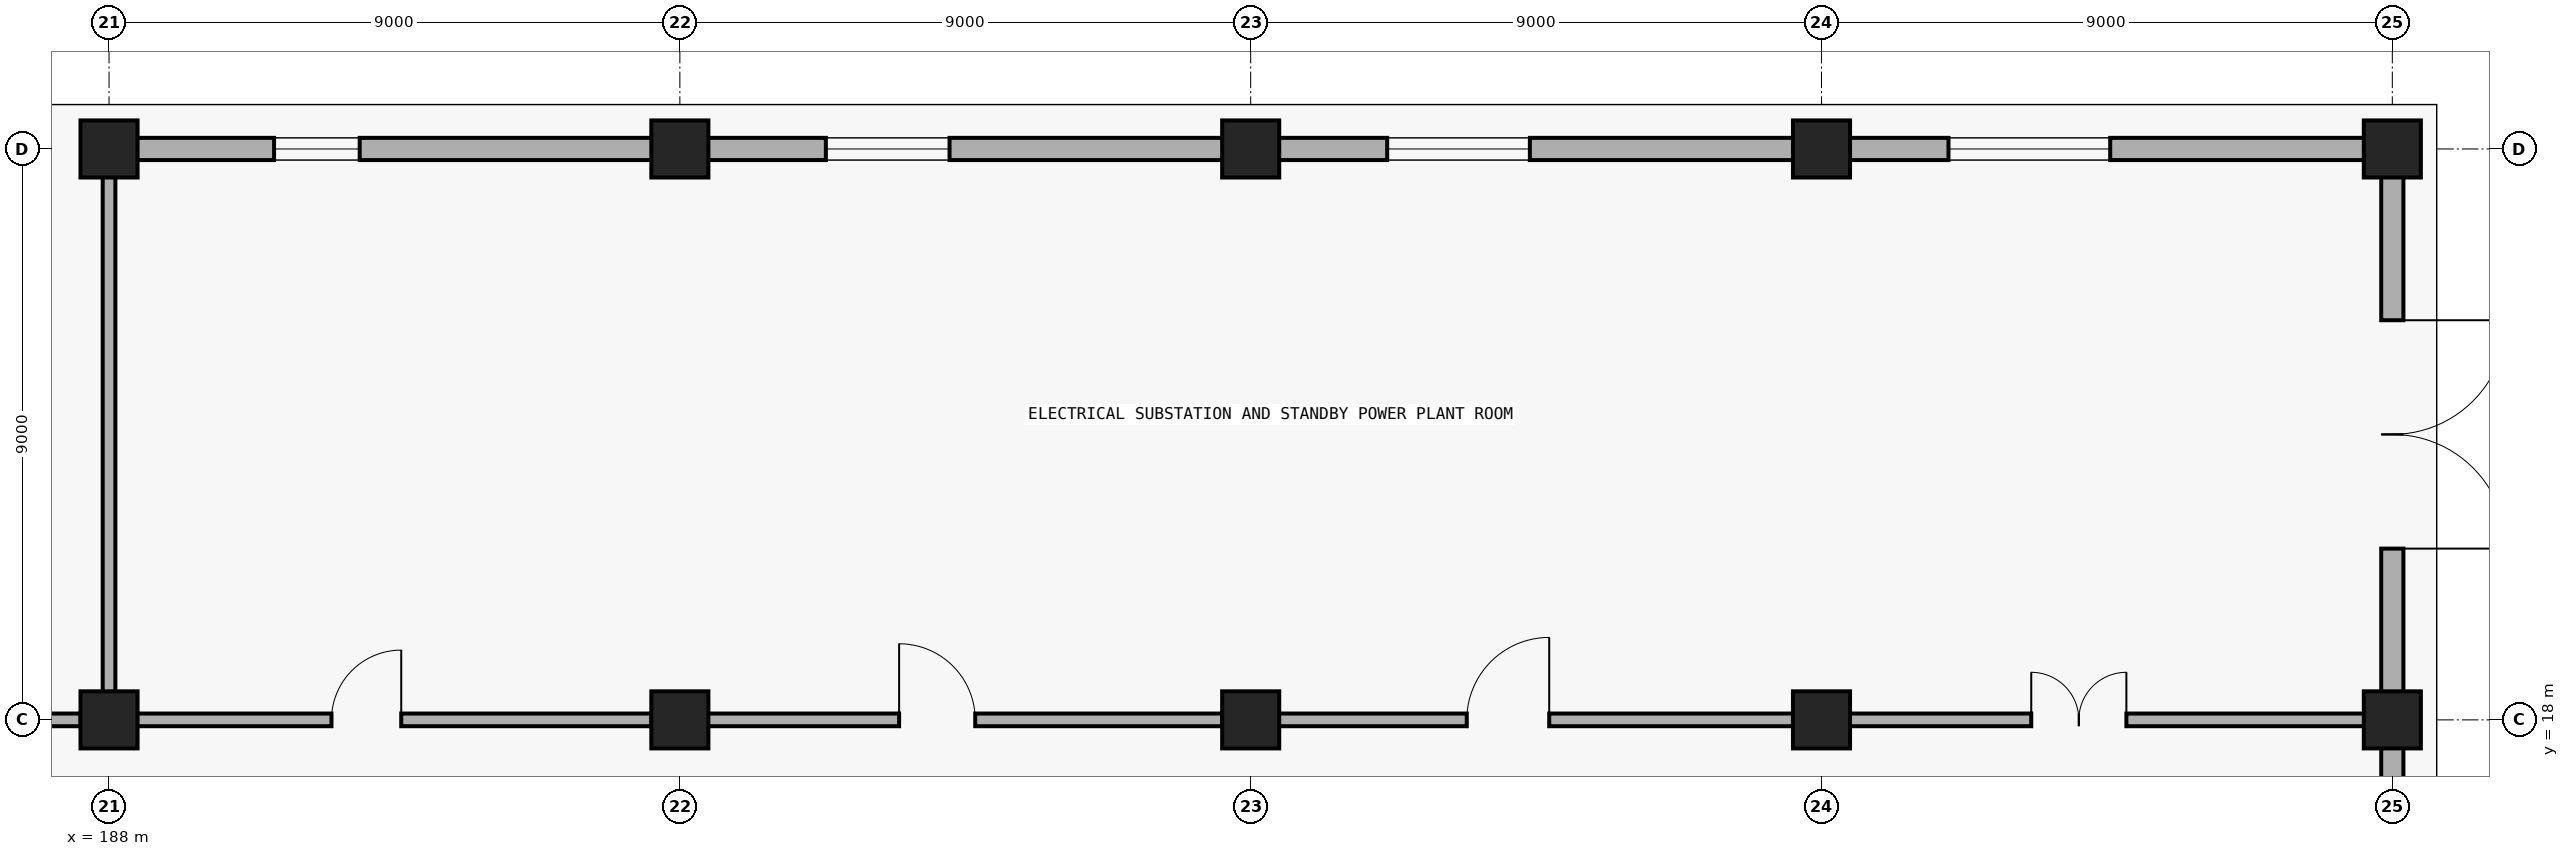
"""IFC4 building model, lengths in metres.
Left out: names, types, materials, properties, quantities, classifications, styles, units other than length and angle.
Written with IfcOpenShell. Run it as: python <this file> out.ifc"""

import sys

from ifc_helpers import new_model, si_unit, direction, frame, frame_2d, origin, origin_2d, place, context, subcontext, project, spatial, rectangle, extrude, element, fill, save


model = new_model("IFC4")
c1 = context("Model", 3, precision=1e-05, world=origin(), true_north=direction((0.0, 1.0)))
c2 = subcontext(c1, "Body", "Model", "MODEL_VIEW")
j1 = project(units=[si_unit("LENGTHUNIT", "METRE"), si_unit("PLANEANGLEUNIT", "RADIAN")], contexts=[c1])
p1 = place(None, origin())
s1 = spatial("IfcSite", under=j1, at=p1, CompositionType="ELEMENT")
p2 = place(p1, origin())
s2 = spatial("IfcBuilding", under=s1, at=p2, CompositionType="ELEMENT")
p3 = place(p2, origin())
s3 = spatial("IfcBuildingStorey", under=s2, at=p3, CompositionType="ELEMENT", Elevation=0.0)
for number, where, z_axis, x_axis in (
    (1, (188.0, 18.0, 0.0), (0.0, 0.0, 1.0), (1.0, 0.0, 0.0)),
    (2, (188.0, 27.0, 0.0), (0.0, 0.0, 1.0), (1.0, 0.0, 0.0)),
    (3, (197.0, 18.0, 0.0), (0.0, 0.0, 1.0), (1.0, 0.0, 0.0)),
    (4, (197.0, 27.0, 0.0), (0.0, 0.0, 1.0), (1.0, 0.0, 0.0)),
    (5, (206.0, 18.0, 0.0), (0.0, 0.0, 1.0), (1.0, 0.0, 0.0)),
    (6, (206.0, 27.0, 0.0), (0.0, 0.0, 1.0), (1.0, 0.0, 0.0)),
    (7, (215.0, 18.0, 0.0), (0.0, 0.0, 1.0), (1.0, 0.0, 0.0)),
    (8, (215.0, 27.0, 0.0), (0.0, 0.0, 1.0), (1.0, 0.0, 0.0)),
    (9, (224.0, 18.0, 0.0), (0.0, 0.0, 1.0), (1.0, 0.0, 0.0)),
    (10, (224.0, 27.0, 0.0), (0.0, 0.0, 1.0), (1.0, 0.0, 0.0)),
):
    element("IfcColumn", number, at=place(p3, frame(where, z_axis=z_axis, x_axis=x_axis)), inside=s3, PredefinedType="COLUMN", context=c2, shape_type="SweptSolid", body=[
        extrude(rectangle(XDim=0.9, YDim=0.9, at=origin_2d()), origin(), (0.0, 0.0, 1.0), 5.4),
    ])
p4 = place(p3, frame((224.0, 26.575, 0.0), z_axis=(0.0, 0.0, 1.0), x_axis=(0.0, -1.0, 0.0)))
e11 = element("IfcWall", 11, at=p4, inside=s3, PredefinedType="STANDARD", context=c2, shape_type="SweptSolid", body=[
    extrude(rectangle(XDim=8.15, YDim=0.35, at=frame_2d((4.075, 0.0))), origin(), (0.0, 0.0, 1.0), 4.417),
])
p5 = place(p4, frame((2.275, 0.0, 0.0)))
e12 = element("IfcOpeningElement", 12, at=p5, cuts=e11, PredefinedType="OPENING", context=c2, shape_type="SweptSolid", body=[
    extrude(rectangle(XDim=3.6, YDim=2.7, at=frame_2d((1.8, 1.35))), frame((0.0, 0.185, 0.0), z_axis=(0.0, -1.0, 0.0), x_axis=(1.0, 0.0, 0.0)), (0.0, 0.0, 1.0), 0.37),
])
p6 = place(p3, frame((224.0, 17.575, 0.0), z_axis=(0.0, 0.0, 1.0), x_axis=(0.0, -1.0, 0.0)))
e13 = element("IfcWall", 13, at=p6, inside=s3, PredefinedType="STANDARD", context=c2, shape_type="SweptSolid", body=[
    extrude(rectangle(XDim=8.15, YDim=0.35, at=frame_2d((4.075, 0.0))), origin(), (0.0, 0.0, 1.0), 4.417),
])
p7 = place(p6, frame((2.275, 0.0, 0.0)))
e14 = element("IfcOpeningElement", 14, at=p7, cuts=e13, PredefinedType="OPENING", context=c2, shape_type="SweptSolid", body=[
    extrude(rectangle(XDim=3.6, YDim=2.7, at=frame_2d((1.8, 1.35))), frame((0.0, 0.185, 0.0), z_axis=(0.0, -1.0, 0.0), x_axis=(1.0, 0.0, 0.0)), (0.0, 0.0, 1.0), 0.37),
])
p8 = place(p3, frame((188.425, 27.0, 0.0), z_axis=(0.0, 0.0, 1.0), x_axis=(1.0, 0.0, 0.0)))
e15 = element("IfcWall", 15, at=p8, inside=s3, PredefinedType="STANDARD", context=c2, shape_type="SweptSolid", body=[
    extrude(rectangle(XDim=8.15, YDim=0.35, at=frame_2d((4.075, 0.0))), origin(), (0.0, 0.0, 1.0), 4.384),
])
p9 = place(p8, frame((2.177, 0.0, 0.95)))
e16 = element("IfcOpeningElement", 16, at=p9, cuts=e15, PredefinedType="OPENING", context=c2, shape_type="SweptSolid", body=[
    extrude(rectangle(XDim=1.35, YDim=1.9, at=frame_2d((0.675, 0.95))), frame((0.0, 0.185, 0.0), z_axis=(0.0, -1.0, 0.0), x_axis=(1.0, 0.0, 0.0)), (0.0, 0.0, 1.0), 0.37),
])
p10 = place(p3, frame((197.425, 27.0, 0.0), z_axis=(0.0, 0.0, 1.0), x_axis=(1.0, 0.0, 0.0)))
e17 = element("IfcWall", 17, at=p10, inside=s3, PredefinedType="STANDARD", context=c2, shape_type="SweptSolid", body=[
    extrude(rectangle(XDim=8.15, YDim=0.35, at=frame_2d((4.075, 0.0))), origin(), (0.0, 0.0, 1.0), 4.384),
])
p11 = place(p10, frame((1.877, 0.0, 0.95)))
e18 = element("IfcOpeningElement", 18, at=p11, cuts=e17, PredefinedType="OPENING", context=c2, shape_type="SweptSolid", body=[
    extrude(rectangle(XDim=1.95, YDim=2.05, at=frame_2d((0.975, 1.025))), frame((0.0, 0.185, 0.0), z_axis=(0.0, -1.0, 0.0), x_axis=(1.0, 0.0, 0.0)), (0.0, 0.0, 1.0), 0.37),
])
p12 = place(p3, frame((206.425, 27.0, 0.0), z_axis=(0.0, 0.0, 1.0), x_axis=(1.0, 0.0, 0.0)))
e19 = element("IfcWall", 19, at=p12, inside=s3, PredefinedType="STANDARD", context=c2, shape_type="SweptSolid", body=[
    extrude(rectangle(XDim=8.15, YDim=0.35, at=frame_2d((4.075, 0.0))), origin(), (0.0, 0.0, 1.0), 4.384),
])
p13 = place(p12, frame((1.727, 0.0, 0.95)))
e20 = element("IfcOpeningElement", 20, at=p13, cuts=e19, PredefinedType="OPENING", context=c2, shape_type="SweptSolid", body=[
    extrude(rectangle(XDim=2.25, YDim=2.15, at=frame_2d((1.125, 1.075))), frame((0.0, 0.185, 0.0), z_axis=(0.0, -1.0, 0.0), x_axis=(1.0, 0.0, 0.0)), (0.0, 0.0, 1.0), 0.37),
])
p14 = place(p3, frame((215.425, 27.0, 0.0), z_axis=(0.0, 0.0, 1.0), x_axis=(1.0, 0.0, 0.0)))
e21 = element("IfcWall", 21, at=p14, inside=s3, PredefinedType="STANDARD", context=c2, shape_type="SweptSolid", body=[
    extrude(rectangle(XDim=8.15, YDim=0.35, at=frame_2d((4.075, 0.0))), origin(), (0.0, 0.0, 1.0), 4.384),
])
p15 = place(p14, frame((1.577, 0.0, 0.95)))
e22 = element("IfcOpeningElement", 22, at=p15, cuts=e21, PredefinedType="OPENING", context=c2, shape_type="SweptSolid", body=[
    extrude(rectangle(XDim=2.55, YDim=2.2, at=frame_2d((1.275, 1.1))), frame((0.0, 0.185, 0.0), z_axis=(0.0, -1.0, 0.0), x_axis=(1.0, 0.0, 0.0)), (0.0, 0.0, 1.0), 0.37),
])
p16 = place(p3, frame((178.55, 18.0, 0.0), z_axis=(0.0, 0.0, 1.0), x_axis=(1.0, 0.0, 0.0)))
e23 = element("IfcWall", 23, at=p16, inside=s3, PredefinedType="PARTITIONING", context=c2, shape_type="SweptSolid", body=[
    extrude(rectangle(XDim=9.015, YDim=0.2, at=frame_2d((4.507, 0.0))), origin(), (0.0, 0.0, 1.0), 4.384),
])
p17 = place(p16, frame((3.932, 0.0, 0.0)))
e24 = element("IfcOpeningElement", 24, at=p17, cuts=e23, PredefinedType="OPENING", context=c2, shape_type="SweptSolid", body=[
    extrude(rectangle(XDim=1.15, YDim=2.2, at=frame_2d((0.575, 1.1))), frame((0.0, 0.11, 0.0), z_axis=(0.0, -1.0, 0.0), x_axis=(1.0, 0.0, 0.0)), (0.0, 0.0, 1.0), 0.22),
])
p18 = place(p3, frame((187.55, 18.0, 0.0), z_axis=(0.0, 0.0, 1.0), x_axis=(1.0, 0.0, 0.0)))
e25 = element("IfcWall", 25, at=p18, inside=s3, PredefinedType="PARTITIONING", context=c2, shape_type="SweptSolid", body=[
    extrude(rectangle(XDim=9.015, YDim=0.2, at=frame_2d((4.507, 0.0))), origin(), (0.0, 0.0, 1.0), 4.384),
])
p19 = place(p18, frame((3.957, 0.0, 0.0)))
e26 = element("IfcOpeningElement", 26, at=p19, cuts=e25, PredefinedType="OPENING", context=c2, shape_type="SweptSolid", body=[
    extrude(rectangle(XDim=1.1, YDim=2.15, at=frame_2d((0.55, 1.075))), frame((0.0, 0.11, 0.0), z_axis=(0.0, -1.0, 0.0), x_axis=(1.0, 0.0, 0.0)), (0.0, 0.0, 1.0), 0.22),
])
p20 = place(p3, frame((196.55, 18.0, 0.0), z_axis=(0.0, 0.0, 1.0), x_axis=(1.0, 0.0, 0.0)))
e27 = element("IfcWall", 27, at=p20, inside=s3, PredefinedType="PARTITIONING", context=c2, shape_type="SweptSolid", body=[
    extrude(rectangle(XDim=9.015, YDim=0.2, at=frame_2d((4.507, 0.0))), origin(), (0.0, 0.0, 1.0), 4.384),
])
p21 = place(p20, frame((3.907, 0.0, 0.0)))
e28 = element("IfcOpeningElement", 28, at=p21, cuts=e27, PredefinedType="OPENING", context=c2, shape_type="SweptSolid", body=[
    extrude(rectangle(XDim=1.2, YDim=2.25, at=frame_2d((0.6, 1.125))), frame((0.0, 0.11, 0.0), z_axis=(0.0, -1.0, 0.0), x_axis=(1.0, 0.0, 0.0)), (0.0, 0.0, 1.0), 0.22),
])
p22 = place(p3, frame((205.55, 18.0, 0.0), z_axis=(0.0, 0.0, 1.0), x_axis=(1.0, 0.0, 0.0)))
e29 = element("IfcWall", 29, at=p22, inside=s3, PredefinedType="PARTITIONING", context=c2, shape_type="SweptSolid", body=[
    extrude(rectangle(XDim=9.015, YDim=0.2, at=frame_2d((4.507, 0.0))), origin(), (0.0, 0.0, 1.0), 4.384),
])
p23 = place(p22, frame((3.857, 0.0, 0.0)))
e30 = element("IfcOpeningElement", 30, at=p23, cuts=e29, PredefinedType="OPENING", context=c2, shape_type="SweptSolid", body=[
    extrude(rectangle(XDim=1.3, YDim=2.25, at=frame_2d((0.65, 1.125))), frame((0.0, 0.11, 0.0), z_axis=(0.0, -1.0, 0.0), x_axis=(1.0, 0.0, 0.0)), (0.0, 0.0, 1.0), 0.22),
])
p24 = place(p3, frame((214.55, 18.0, 0.0), z_axis=(0.0, 0.0, 1.0), x_axis=(1.0, 0.0, 0.0)))
e31 = element("IfcWall", 31, at=p24, inside=s3, PredefinedType="PARTITIONING", context=c2, shape_type="SweptSolid", body=[
    extrude(rectangle(XDim=9.015, YDim=0.2, at=frame_2d((4.507, 0.0))), origin(), (0.0, 0.0, 1.0), 4.384),
])
p25 = place(p24, frame((3.757, 0.0, 0.0)))
e32 = element("IfcOpeningElement", 32, at=p25, cuts=e31, PredefinedType="OPENING", context=c2, shape_type="SweptSolid", body=[
    extrude(rectangle(XDim=1.5, YDim=2.15, at=frame_2d((0.75, 1.075))), frame((0.0, 0.11, 0.0), z_axis=(0.0, -1.0, 0.0), x_axis=(1.0, 0.0, 0.0)), (0.0, 0.0, 1.0), 0.22),
])
p26 = place(p3, frame((188.0, 18.085, 0.0), z_axis=(0.0, 0.0, 1.0), x_axis=(0.0, 1.0, 0.0)))
e33 = element("IfcWall", 33, at=p26, inside=s3, PredefinedType="PARTITIONING", context=c2, shape_type="SweptSolid", body=[
    extrude(rectangle(XDim=8.48, YDim=0.2, at=frame_2d((4.24, 0.0))), origin(), (0.0, 0.0, 1.0), 4.417),
])
p27 = place(p5, origin())
e34 = element("IfcDoor", 34, at=p27, inside=s3, OperationType="DOUBLE_DOOR_SINGLE_SWING", PredefinedType="DOOR", context=c2, shape_type="SweptSolid", body=[
    extrude(rectangle(XDim=3.6, YDim=2.7, at=frame_2d((1.8, 1.35))), frame((0.0, 0.025, 0.0), z_axis=(0.0, -1.0, 0.0), x_axis=(1.0, 0.0, 0.0)), (0.0, 0.0, 1.0), 0.05),
])
fill(e12, e34)
p28 = place(p9, origin())
e35 = element("IfcWindow", 35, at=p28, inside=s3, PartitioningType="SINGLE_PANEL", PredefinedType="WINDOW", context=c2, shape_type="SweptSolid", body=[
    extrude(rectangle(XDim=1.35, YDim=1.9, at=frame_2d((0.675, 0.95))), frame((0.0, 0.03, 0.0), z_axis=(0.0, -1.0, 0.0), x_axis=(1.0, 0.0, 0.0)), (0.0, 0.0, 1.0), 0.06),
])
fill(e16, e35)
p29 = place(p11, origin())
e36 = element("IfcWindow", 36, at=p29, inside=s3, PartitioningType="SINGLE_PANEL", PredefinedType="WINDOW", context=c2, shape_type="SweptSolid", body=[
    extrude(rectangle(XDim=1.95, YDim=2.05, at=frame_2d((0.975, 1.025))), frame((0.0, 0.03, 0.0), z_axis=(0.0, -1.0, 0.0), x_axis=(1.0, 0.0, 0.0)), (0.0, 0.0, 1.0), 0.06),
])
fill(e18, e36)
p30 = place(p13, origin())
e37 = element("IfcWindow", 37, at=p30, inside=s3, PartitioningType="SINGLE_PANEL", PredefinedType="WINDOW", context=c2, shape_type="SweptSolid", body=[
    extrude(rectangle(XDim=2.25, YDim=2.15, at=frame_2d((1.125, 1.075))), frame((0.0, 0.03, 0.0), z_axis=(0.0, -1.0, 0.0), x_axis=(1.0, 0.0, 0.0)), (0.0, 0.0, 1.0), 0.06),
])
fill(e20, e37)
p31 = place(p15, origin())
e38 = element("IfcWindow", 38, at=p31, inside=s3, PartitioningType="SINGLE_PANEL", PredefinedType="WINDOW", context=c2, shape_type="SweptSolid", body=[
    extrude(rectangle(XDim=2.55, YDim=2.2, at=frame_2d((1.275, 1.1))), frame((0.0, 0.03, 0.0), z_axis=(0.0, -1.0, 0.0), x_axis=(1.0, 0.0, 0.0)), (0.0, 0.0, 1.0), 0.06),
])
fill(e22, e38)
p32 = place(p19, origin())
e39 = element("IfcDoor", 39, at=p32, inside=s3, OperationType="SINGLE_SWING_RIGHT", PredefinedType="DOOR", context=c2, shape_type="SweptSolid", body=[
    extrude(rectangle(XDim=1.1, YDim=2.15, at=frame_2d((0.55, 1.075))), frame((0.0, 0.025, 0.0), z_axis=(0.0, -1.0, 0.0), x_axis=(1.0, 0.0, 0.0)), (0.0, 0.0, 1.0), 0.05),
])
fill(e26, e39)
p33 = place(p21, origin())
e40 = element("IfcDoor", 40, at=p33, inside=s3, OperationType="SINGLE_SWING_LEFT", PredefinedType="DOOR", context=c2, shape_type="SweptSolid", body=[
    extrude(rectangle(XDim=1.2, YDim=2.25, at=frame_2d((0.6, 1.125))), frame((0.0, 0.025, 0.0), z_axis=(0.0, -1.0, 0.0), x_axis=(1.0, 0.0, 0.0)), (0.0, 0.0, 1.0), 0.05),
])
fill(e28, e40)
p34 = place(p23, origin())
e41 = element("IfcDoor", 41, at=p34, inside=s3, OperationType="SINGLE_SWING_RIGHT", PredefinedType="DOOR", context=c2, shape_type="SweptSolid", body=[
    extrude(rectangle(XDim=1.3, YDim=2.25, at=frame_2d((0.65, 1.125))), frame((0.0, 0.025, 0.0), z_axis=(0.0, -1.0, 0.0), x_axis=(1.0, 0.0, 0.0)), (0.0, 0.0, 1.0), 0.05),
])
fill(e30, e41)
p35 = place(p25, origin())
e42 = element("IfcDoor", 42, at=p35, inside=s3, OperationType="DOUBLE_DOOR_SINGLE_SWING", PredefinedType="DOOR", context=c2, shape_type="SweptSolid", body=[
    extrude(rectangle(XDim=1.5, YDim=2.15, at=frame_2d((0.75, 1.075))), frame((0.0, 0.025, 0.0), z_axis=(0.0, -1.0, 0.0), x_axis=(1.0, 0.0, 0.0)), (0.0, 0.0, 1.0), 0.05),
])
fill(e32, e42)
save(model, sys.argv[1])
